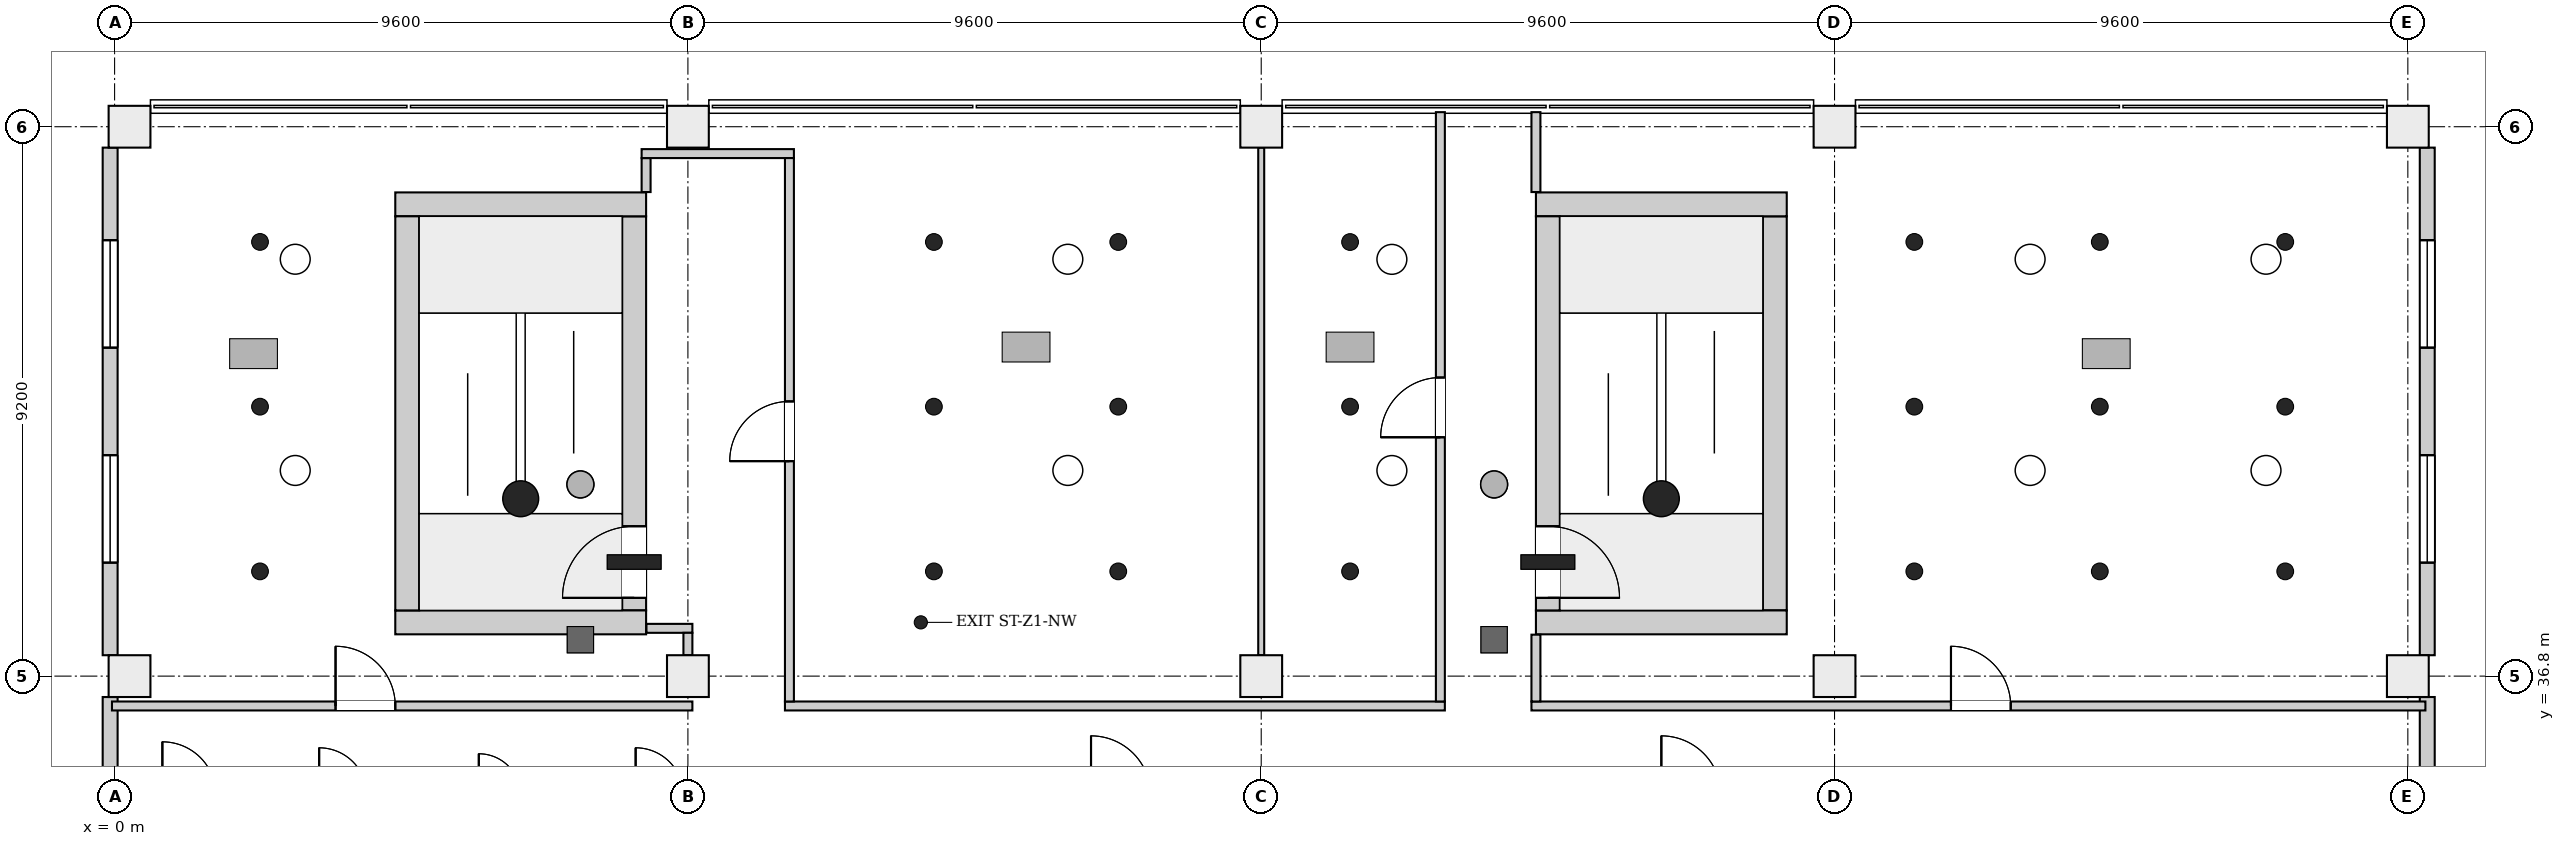
"""IFC4 building model, lengths in metres.
Left out: names, types, materials, properties, quantities, classifications, styles, units other than length and angle.
Written with IfcOpenShell. Run it as: python <this file> out.ifc"""

import sys

from ifc_helpers import new_model, si_unit, direction, frame, frame_2d, origin, origin_2d, place, context, subcontext, project, spatial, rectangle, extrude, element, fill, save


model = new_model("IFC4")
c1 = context("Model", 3, precision=1e-05, world=origin(), true_north=direction((0.0, 1.0)))
c2 = subcontext(c1, "Body", "Model", "MODEL_VIEW")
j1 = project(units=[si_unit("LENGTHUNIT", "METRE"), si_unit("PLANEANGLEUNIT", "RADIAN")], contexts=[c1])
p1 = place(None, origin())
s1 = spatial("IfcSite", under=j1, at=p1, CompositionType="ELEMENT")
p2 = place(p1, origin())
s2 = spatial("IfcBuilding", under=s1, at=p2, CompositionType="ELEMENT")
p3 = place(p2, frame((0.0, 0.0, 69.7)))
s3 = spatial("IfcBuildingStorey", under=s2, at=p3, CompositionType="ELEMENT", Elevation=69.7)
for number, where, z_axis, x_axis in (
    (1, (4.7, 37.7, 0.0), (0.0, 0.0, 1.0), (1.0, 0.0, 0.0)),
    (2, (4.7, 44.7, 0.0), (0.0, 0.0, 1.0), (1.0, 0.0, 0.0)),
):
    element("IfcWall", number, at=place(p3, frame(where, z_axis=z_axis, x_axis=x_axis)), inside=s3, PredefinedType="SHEAR", context=c2, shape_type="SweptSolid", body=[
        extrude(rectangle(XDim=4.2, YDim=0.4, at=frame_2d((2.1, 0.0))), origin(), (0.0, 0.0, 1.0), 4.2),
    ])
p4 = place(p3, frame((4.9, 37.9, 0.0), z_axis=(0.0, 0.0, 1.0), x_axis=(0.0, 1.0, 0.0)))
e3 = element("IfcWall", 3, at=p4, inside=s3, PredefinedType="SHEAR", context=c2, shape_type="SweptSolid", body=[
    extrude(rectangle(XDim=6.6, YDim=0.4, at=frame_2d((3.3, 0.0))), origin(), (0.0, 0.0, 1.0), 4.2),
])
p5 = place(p3, frame((8.7, 37.9, 0.0), z_axis=(0.0, 0.0, 1.0), x_axis=(0.0, 1.0, 0.0)))
e4 = element("IfcWall", 4, at=p5, inside=s3, PredefinedType="SHEAR", context=c2, shape_type="SweptSolid", body=[
    extrude(rectangle(XDim=6.6, YDim=0.4, at=frame_2d((3.3, 0.0))), origin(), (0.0, 0.0, 1.0), 4.2),
])
p6 = place(p5, frame((0.21, 0.0, 0.0)))
e5 = element("IfcOpeningElement", 5, at=p6, cuts=e4, PredefinedType="OPENING", context=c2, shape_type="SweptSolid", body=[
    extrude(rectangle(XDim=1.2, YDim=2.1, at=frame_2d((0.6, 1.05))), frame((0.0, 0.21, 0.0), z_axis=(0.0, -1.0, 0.0), x_axis=(1.0, 0.0, 0.0)), (0.0, 0.0, 1.0), 0.42),
])
for number, where, z_axis, x_axis in (
    (6, (23.8, 37.7, 0.0), (0.0, 0.0, 1.0), (1.0, 0.0, 0.0)),
    (7, (23.8, 44.7, 0.0), (0.0, 0.0, 1.0), (1.0, 0.0, 0.0)),
):
    element("IfcWall", number, at=place(p3, frame(where, z_axis=z_axis, x_axis=x_axis)), inside=s3, PredefinedType="SHEAR", context=c2, shape_type="SweptSolid", body=[
        extrude(rectangle(XDim=4.2, YDim=0.4, at=frame_2d((2.1, 0.0))), origin(), (0.0, 0.0, 1.0), 4.2),
    ])
p7 = place(p3, frame((24.0, 37.9, 0.0), z_axis=(0.0, 0.0, 1.0), x_axis=(0.0, 1.0, 0.0)))
e8 = element("IfcWall", 8, at=p7, inside=s3, PredefinedType="SHEAR", context=c2, shape_type="SweptSolid", body=[
    extrude(rectangle(XDim=6.6, YDim=0.4, at=frame_2d((3.3, 0.0))), origin(), (0.0, 0.0, 1.0), 4.2),
])
p8 = place(p7, frame((0.21, 0.0, 0.0)))
e9 = element("IfcOpeningElement", 9, at=p8, cuts=e8, PredefinedType="OPENING", context=c2, shape_type="SweptSolid", body=[
    extrude(rectangle(XDim=1.2, YDim=2.1, at=frame_2d((0.6, 1.05))), frame((0.0, 0.21, 0.0), z_axis=(0.0, -1.0, 0.0), x_axis=(1.0, 0.0, 0.0)), (0.0, 0.0, 1.0), 0.42),
])
p9 = place(p3, frame((27.8, 37.9, 0.0), z_axis=(0.0, 0.0, 1.0), x_axis=(0.0, 1.0, 0.0)))
e10 = element("IfcWall", 10, at=p9, inside=s3, PredefinedType="SHEAR", context=c2, shape_type="SweptSolid", body=[
    extrude(rectangle(XDim=6.6, YDim=0.4, at=frame_2d((3.3, 0.0))), origin(), (0.0, 0.0, 1.0), 4.2),
])
for number, where, z_axis, x_axis in (
    (11, (0.25, 36.8, 0.0), (0.0, 0.0, 1.0), (1.0, 0.0, 0.0)),
    (12, (9.6, 36.8, 0.0), (0.0, 0.0, 1.0), (1.0, 0.0, 0.0)),
    (13, (19.2, 36.8, 0.0), (0.0, 0.0, 1.0), (1.0, 0.0, 0.0)),
    (14, (28.8, 36.8, 0.0), (0.0, 0.0, 1.0), (1.0, 0.0, 0.0)),
    (15, (38.4, 36.8, 0.0), (0.0, 0.0, 1.0), (1.0, 0.0, 0.0)),
    (16, (0.25, 46.0, 0.0), (0.0, 0.0, 1.0), (1.0, 0.0, 0.0)),
    (17, (9.6, 46.0, 0.0), (0.0, 0.0, 1.0), (1.0, 0.0, 0.0)),
    (18, (19.2, 46.0, 0.0), (0.0, 0.0, 1.0), (1.0, 0.0, 0.0)),
    (19, (28.8, 46.0, 0.0), (0.0, 0.0, 1.0), (1.0, 0.0, 0.0)),
    (20, (38.4, 46.0, 0.0), (0.0, 0.0, 1.0), (1.0, 0.0, 0.0)),
):
    element("IfcColumn", number, at=place(p3, frame(where, z_axis=z_axis, x_axis=x_axis)), inside=s3, PredefinedType="COLUMN", context=c2, shape_type="SweptSolid", body=[
        extrude(rectangle(XDim=0.7, YDim=0.7, at=origin_2d()), origin(), (0.0, 0.0, 1.0), 4.2),
    ])
p10 = place(p3, frame((-0.074, 36.45, 0.0), z_axis=(0.0, 0.0, 1.0), x_axis=(0.0, -1.0, 0.0)))
e21 = element("IfcWall", 21, at=p10, inside=s3, PredefinedType="ELEMENTEDWALL", context=c2, shape_type="SweptSolid", body=[
    extrude(rectangle(XDim=8.5, YDim=0.25, at=frame_2d((4.25, 0.0))), origin(), (0.0, 0.0, 1.0), 3.9),
])
p11 = place(p10, frame((5.15, 0.0, 0.9)))
e22 = element("IfcOpeningElement", 22, at=p11, cuts=e21, PredefinedType="OPENING", context=c2, shape_type="SweptSolid", body=[
    extrude(rectangle(XDim=1.8, YDim=2.6, at=frame_2d((0.9, 1.3))), frame((0.0, 0.135, 0.0), z_axis=(0.0, -1.0, 0.0), x_axis=(1.0, 0.0, 0.0)), (0.0, 0.0, 1.0), 0.27),
])
p12 = place(p10, frame((1.8, 0.0, 0.9)))
e23 = element("IfcOpeningElement", 23, at=p12, cuts=e21, PredefinedType="OPENING", context=c2, shape_type="SweptSolid", body=[
    extrude(rectangle(XDim=1.8, YDim=2.6, at=frame_2d((0.9, 1.3))), frame((0.0, 0.135, 0.0), z_axis=(0.0, -1.0, 0.0), x_axis=(1.0, 0.0, 0.0)), (0.0, 0.0, 1.0), 0.27),
])
p13 = place(p3, frame((-0.074, 45.65, 0.0), z_axis=(0.0, 0.0, 1.0), x_axis=(0.0, -1.0, 0.0)))
e24 = element("IfcWall", 24, at=p13, inside=s3, PredefinedType="ELEMENTEDWALL", context=c2, shape_type="SweptSolid", body=[
    extrude(rectangle(XDim=8.5, YDim=0.25, at=frame_2d((4.25, 0.0))), origin(), (0.0, 0.0, 1.0), 3.9),
])
p14 = place(p13, frame((5.15, 0.0, 0.9)))
e25 = element("IfcOpeningElement", 25, at=p14, cuts=e24, PredefinedType="OPENING", context=c2, shape_type="SweptSolid", body=[
    extrude(rectangle(XDim=1.8, YDim=2.6, at=frame_2d((0.9, 1.3))), frame((0.0, 0.135, 0.0), z_axis=(0.0, -1.0, 0.0), x_axis=(1.0, 0.0, 0.0)), (0.0, 0.0, 1.0), 0.27),
])
p15 = place(p13, frame((1.55, 0.0, 0.9)))
e26 = element("IfcOpeningElement", 26, at=p15, cuts=e24, PredefinedType="OPENING", context=c2, shape_type="SweptSolid", body=[
    extrude(rectangle(XDim=1.8, YDim=2.6, at=frame_2d((0.9, 1.3))), frame((0.0, 0.135, 0.0), z_axis=(0.0, -1.0, 0.0), x_axis=(1.0, 0.0, 0.0)), (0.0, 0.0, 1.0), 0.27),
])
p16 = place(p3, frame((38.725, 27.95, 0.0), z_axis=(0.0, 0.0, 1.0), x_axis=(0.0, 1.0, 0.0)))
e27 = element("IfcWall", 27, at=p16, inside=s3, PredefinedType="ELEMENTEDWALL", context=c2, shape_type="SweptSolid", body=[
    extrude(rectangle(XDim=8.5, YDim=0.25, at=frame_2d((4.25, 0.0))), origin(), (0.0, 0.0, 1.0), 3.9),
])
p17 = place(p16, frame((4.35, 0.0, 0.0)))
e28 = element("IfcOpeningElement", 28, at=p17, cuts=e27, PredefinedType="OPENING", context=c2, shape_type="SweptSolid", body=[
    extrude(rectangle(XDim=1.8, YDim=2.4, at=frame_2d((0.9, 1.2))), frame((0.0, 0.135, 0.0), z_axis=(0.0, -1.0, 0.0), x_axis=(1.0, 0.0, 0.0)), (0.0, 0.0, 1.0), 0.27),
])
p18 = place(p16, frame((1.55, 0.0, 0.9)))
e29 = element("IfcOpeningElement", 29, at=p18, cuts=e27, PredefinedType="OPENING", context=c2, shape_type="SweptSolid", body=[
    extrude(rectangle(XDim=1.8, YDim=2.6, at=frame_2d((0.9, 1.3))), frame((0.0, 0.135, 0.0), z_axis=(0.0, -1.0, 0.0), x_axis=(1.0, 0.0, 0.0)), (0.0, 0.0, 1.0), 0.27),
])
p19 = place(p3, frame((38.725, 37.15, 0.0), z_axis=(0.0, 0.0, 1.0), x_axis=(0.0, 1.0, 0.0)))
e30 = element("IfcWall", 30, at=p19, inside=s3, PredefinedType="ELEMENTEDWALL", context=c2, shape_type="SweptSolid", body=[
    extrude(rectangle(XDim=8.5, YDim=0.25, at=frame_2d((4.25, 0.0))), origin(), (0.0, 0.0, 1.0), 3.9),
])
p20 = place(p19, frame((1.55, 0.0, 0.9)))
e31 = element("IfcOpeningElement", 31, at=p20, cuts=e30, PredefinedType="OPENING", context=c2, shape_type="SweptSolid", body=[
    extrude(rectangle(XDim=1.8, YDim=2.6, at=frame_2d((0.9, 1.3))), frame((0.0, 0.135, 0.0), z_axis=(0.0, -1.0, 0.0), x_axis=(1.0, 0.0, 0.0)), (0.0, 0.0, 1.0), 0.27),
])
p21 = place(p19, frame((5.15, 0.0, 0.9)))
e32 = element("IfcOpeningElement", 32, at=p21, cuts=e30, PredefinedType="OPENING", context=c2, shape_type="SweptSolid", body=[
    extrude(rectangle(XDim=1.8, YDim=2.6, at=frame_2d((0.9, 1.3))), frame((0.0, 0.135, 0.0), z_axis=(0.0, -1.0, 0.0), x_axis=(1.0, 0.0, 0.0)), (0.0, 0.0, 1.0), 0.27),
])
p22 = place(p3, frame((-0.044, 36.3, 0.0), z_axis=(0.0, 0.0, 1.0), x_axis=(1.0, 0.0, 0.0)))
e33 = element("IfcWall", 33, at=p22, inside=s3, PredefinedType="PARTITIONING", context=c2, shape_type="SweptSolid", body=[
    extrude(rectangle(XDim=9.719, YDim=0.15, at=frame_2d((4.859, 0.0))), origin(), (0.0, 0.0, 1.0), 3.9),
])
p23 = place(p22, frame((3.744, 0.0, 0.0)))
e34 = element("IfcOpeningElement", 34, at=p23, cuts=e33, PredefinedType="OPENING", context=c2, shape_type="SweptSolid", body=[
    extrude(rectangle(XDim=1.0, YDim=2.1, at=frame_2d((0.5, 1.05))), frame((0.0, 0.085, 0.0), z_axis=(0.0, -1.0, 0.0), x_axis=(1.0, 0.0, 0.0)), (0.0, 0.0, 1.0), 0.17),
])
p24 = place(p3, frame((8.9, 44.906, 0.0), z_axis=(0.0, 0.0, 1.0), x_axis=(0.0, 1.0, 0.0)))
e35 = element("IfcWall", 35, at=p24, inside=s3, PredefinedType="PARTITIONING", context=c2, shape_type="SweptSolid", body=[
    extrude(rectangle(XDim=0.569, YDim=0.15, at=frame_2d((0.285, 0.0))), origin(), (0.0, 0.0, 1.0), 3.9),
])
p25 = place(p3, frame((8.825, 45.55, 0.0), z_axis=(0.0, 0.0, 1.0), x_axis=(1.0, 0.0, 0.0)))
e36 = element("IfcWall", 36, at=p25, inside=s3, PredefinedType="PARTITIONING", context=c2, shape_type="SweptSolid", body=[
    extrude(rectangle(XDim=2.55, YDim=0.15, at=frame_2d((1.275, 0.0))), origin(), (0.0, 0.0, 1.0), 3.9),
])
p26 = place(p3, frame((8.906, 37.6, 0.0), z_axis=(0.0, 0.0, 1.0), x_axis=(1.0, 0.0, 0.0)))
e37 = element("IfcWall", 37, at=p26, inside=s3, PredefinedType="PARTITIONING", context=c2, shape_type="SweptSolid", body=[
    extrude(rectangle(XDim=0.769, YDim=0.15, at=frame_2d((0.385, 0.0))), origin(), (0.0, 0.0, 1.0), 3.9),
])
p27 = place(p3, frame((9.6, 37.15, 0.0), z_axis=(0.0, 0.0, 1.0), x_axis=(0.0, 1.0, 0.0)))
e38 = element("IfcWall", 38, at=p27, inside=s3, PredefinedType="PARTITIONING", context=c2, shape_type="SweptSolid", body=[
    extrude(rectangle(XDim=0.375, YDim=0.15, at=frame_2d((0.188, 0.0))), origin(), (0.0, 0.0, 1.0), 3.9),
])
p28 = place(p3, frame((11.225, 36.3, 0.0), z_axis=(0.0, 0.0, 1.0), x_axis=(1.0, 0.0, 0.0)))
e39 = element("IfcWall", 39, at=p28, inside=s3, PredefinedType="PARTITIONING", context=c2, shape_type="SweptSolid", body=[
    extrude(rectangle(XDim=11.05, YDim=0.15, at=frame_2d((5.525, 0.0))), origin(), (0.0, 0.0, 1.0), 3.9),
])
p29 = place(p3, frame((11.3, 36.375, 0.0), z_axis=(0.0, 0.0, 1.0), x_axis=(0.0, 1.0, 0.0)))
e40 = element("IfcWall", 40, at=p29, inside=s3, PredefinedType="PARTITIONING", context=c2, shape_type="SweptSolid", body=[
    extrude(rectangle(XDim=9.1, YDim=0.15, at=frame_2d((4.55, 0.0))), origin(), (0.0, 0.0, 1.0), 3.9),
])
p30 = place(p29, frame((4.025, 0.0, 0.0)))
e41 = element("IfcOpeningElement", 41, at=p30, cuts=e40, PredefinedType="OPENING", context=c2, shape_type="SweptSolid", body=[
    extrude(rectangle(XDim=1.0, YDim=2.1, at=frame_2d((0.5, 1.05))), frame((0.0, 0.085, 0.0), z_axis=(0.0, -1.0, 0.0), x_axis=(1.0, 0.0, 0.0)), (0.0, 0.0, 1.0), 0.17),
])
p31 = place(p3, frame((19.2, 37.15, 0.0), z_axis=(0.0, 0.0, 1.0), x_axis=(0.0, 1.0, 0.0)))
e42 = element("IfcWall", 42, at=p31, inside=s3, PredefinedType="PARTITIONING", context=c2, shape_type="SweptSolid", body=[
    extrude(rectangle(XDim=8.5, YDim=0.1, at=frame_2d((4.25, 0.0))), origin(), (0.0, 0.0, 1.0), 3.9),
])
p32 = place(p3, frame((22.2, 36.375, 0.0), z_axis=(0.0, 0.0, 1.0), x_axis=(0.0, 1.0, 0.0)))
e43 = element("IfcWall", 43, at=p32, inside=s3, PredefinedType="PARTITIONING", context=c2, shape_type="SweptSolid", body=[
    extrude(rectangle(XDim=9.869, YDim=0.15, at=frame_2d((4.935, 0.0))), origin(), (0.0, 0.0, 1.0), 3.9),
])
p33 = place(p32, frame((4.425, 0.0, 0.0)))
e44 = element("IfcOpeningElement", 44, at=p33, cuts=e43, PredefinedType="OPENING", context=c2, shape_type="SweptSolid", body=[
    extrude(rectangle(XDim=1.0, YDim=2.1, at=frame_2d((0.5, 1.05))), frame((0.0, 0.085, 0.0), z_axis=(0.0, -1.0, 0.0), x_axis=(1.0, 0.0, 0.0)), (0.0, 0.0, 1.0), 0.17),
])
p34 = place(p3, frame((23.725, 36.3, 0.0), z_axis=(0.0, 0.0, 1.0), x_axis=(1.0, 0.0, 0.0)))
e45 = element("IfcWall", 45, at=p34, inside=s3, PredefinedType="PARTITIONING", context=c2, shape_type="SweptSolid", body=[
    extrude(rectangle(XDim=14.969, YDim=0.15, at=frame_2d((7.484, 0.0))), origin(), (0.0, 0.0, 1.0), 3.9),
])
p35 = place(p34, frame((7.025, 0.0, 0.0)))
e46 = element("IfcOpeningElement", 46, at=p35, cuts=e45, PredefinedType="OPENING", context=c2, shape_type="SweptSolid", body=[
    extrude(rectangle(XDim=1.0, YDim=2.1, at=frame_2d((0.5, 1.05))), frame((0.0, 0.085, 0.0), z_axis=(0.0, -1.0, 0.0), x_axis=(1.0, 0.0, 0.0)), (0.0, 0.0, 1.0), 0.17),
])
p36 = place(p3, frame((23.8, 36.375, 0.0), z_axis=(0.0, 0.0, 1.0), x_axis=(0.0, 1.0, 0.0)))
e47 = element("IfcWall", 47, at=p36, inside=s3, PredefinedType="PARTITIONING", context=c2, shape_type="SweptSolid", body=[
    extrude(rectangle(XDim=1.119, YDim=0.15, at=frame_2d((0.56, 0.0))), origin(), (0.0, 0.0, 1.0), 3.9),
])
p37 = place(p3, frame((23.8, 44.906, 0.0), z_axis=(0.0, 0.0, 1.0), x_axis=(0.0, 1.0, 0.0)))
e48 = element("IfcWall", 48, at=p37, inside=s3, PredefinedType="PARTITIONING", context=c2, shape_type="SweptSolid", body=[
    extrude(rectangle(XDim=1.338, YDim=0.15, at=frame_2d((0.669, 0.0))), origin(), (0.0, 0.0, 1.0), 3.9),
])
p38 = place(p14, origin())
e49 = element("IfcWindow", 49, at=p38, inside=s3, PartitioningType="SINGLE_PANEL", PredefinedType="WINDOW", context=c2, shape_type="SweptSolid", body=[
    extrude(rectangle(XDim=1.8, YDim=2.6, at=frame_2d((0.9, 1.3))), frame((0.0, 0.03, 0.0), z_axis=(0.0, -1.0, 0.0), x_axis=(1.0, 0.0, 0.0)), (0.0, 0.0, 1.0), 0.06),
])
fill(e25, e49)
p39 = place(p15, origin())
e50 = element("IfcWindow", 50, at=p39, inside=s3, PartitioningType="SINGLE_PANEL", PredefinedType="WINDOW", context=c2, shape_type="SweptSolid", body=[
    extrude(rectangle(XDim=1.8, YDim=2.6, at=frame_2d((0.9, 1.3))), frame((0.0, 0.03, 0.0), z_axis=(0.0, -1.0, 0.0), x_axis=(1.0, 0.0, 0.0)), (0.0, 0.0, 1.0), 0.06),
])
fill(e26, e50)
p40 = place(p20, origin())
e51 = element("IfcWindow", 51, at=p40, inside=s3, PartitioningType="SINGLE_PANEL", PredefinedType="WINDOW", context=c2, shape_type="SweptSolid", body=[
    extrude(rectangle(XDim=1.8, YDim=2.6, at=frame_2d((0.9, 1.3))), frame((0.0, 0.03, 0.0), z_axis=(0.0, -1.0, 0.0), x_axis=(1.0, 0.0, 0.0)), (0.0, 0.0, 1.0), 0.06),
])
fill(e31, e51)
p41 = place(p21, origin())
e52 = element("IfcWindow", 52, at=p41, inside=s3, PartitioningType="SINGLE_PANEL", PredefinedType="WINDOW", context=c2, shape_type="SweptSolid", body=[
    extrude(rectangle(XDim=1.8, YDim=2.6, at=frame_2d((0.9, 1.3))), frame((0.0, 0.03, 0.0), z_axis=(0.0, -1.0, 0.0), x_axis=(1.0, 0.0, 0.0)), (0.0, 0.0, 1.0), 0.06),
])
fill(e32, e52)
p42 = place(p6, origin())
e53 = element("IfcDoor", 53, at=p42, inside=s3, OperationType="SINGLE_SWING_RIGHT", PredefinedType="DOOR", context=c2, shape_type="SweptSolid", body=[
    extrude(rectangle(XDim=1.2, YDim=2.1, at=frame_2d((0.6, 1.05))), frame((0.0, 0.025, 0.0), z_axis=(0.0, -1.0, 0.0), x_axis=(1.0, 0.0, 0.0)), (0.0, 0.0, 1.0), 0.05),
])
fill(e5, e53)
p43 = place(p8, origin())
e54 = element("IfcDoor", 54, at=p43, inside=s3, OperationType="SINGLE_SWING_LEFT", PredefinedType="DOOR", context=c2, shape_type="SweptSolid", body=[
    extrude(rectangle(XDim=1.2, YDim=2.1, at=frame_2d((0.6, 1.05))), frame((0.0, 0.025, 0.0), z_axis=(0.0, -1.0, 0.0), x_axis=(1.0, 0.0, 0.0)), (0.0, 0.0, 1.0), 0.05),
])
fill(e9, e54)
p44 = place(p23, origin())
e55 = element("IfcDoor", 55, at=p44, inside=s3, OperationType="SINGLE_SWING_RIGHT", PredefinedType="DOOR", context=c2, shape_type="SweptSolid", body=[
    extrude(rectangle(XDim=1.0, YDim=2.1, at=frame_2d((0.5, 1.05))), frame((0.0, 0.025, 0.0), z_axis=(0.0, -1.0, 0.0), x_axis=(1.0, 0.0, 0.0)), (0.0, 0.0, 1.0), 0.05),
])
fill(e34, e55)
p45 = place(p30, origin())
e56 = element("IfcDoor", 56, at=p45, inside=s3, OperationType="SINGLE_SWING_LEFT", PredefinedType="DOOR", context=c2, shape_type="SweptSolid", body=[
    extrude(rectangle(XDim=1.0, YDim=2.1, at=frame_2d((0.5, 1.05))), frame((0.0, 0.025, 0.0), z_axis=(0.0, -1.0, 0.0), x_axis=(1.0, 0.0, 0.0)), (0.0, 0.0, 1.0), 0.05),
])
fill(e41, e56)
p46 = place(p33, origin())
e57 = element("IfcDoor", 57, at=p46, inside=s3, OperationType="SINGLE_SWING_RIGHT", PredefinedType="DOOR", context=c2, shape_type="SweptSolid", body=[
    extrude(rectangle(XDim=1.0, YDim=2.1, at=frame_2d((0.5, 1.05))), frame((0.0, 0.025, 0.0), z_axis=(0.0, -1.0, 0.0), x_axis=(1.0, 0.0, 0.0)), (0.0, 0.0, 1.0), 0.05),
])
fill(e44, e57)
p47 = place(p35, origin())
e58 = element("IfcDoor", 58, at=p47, inside=s3, OperationType="SINGLE_SWING_RIGHT", PredefinedType="DOOR", context=c2, shape_type="SweptSolid", body=[
    extrude(rectangle(XDim=1.0, YDim=2.1, at=frame_2d((0.5, 1.05))), frame((0.0, 0.025, 0.0), z_axis=(0.0, -1.0, 0.0), x_axis=(1.0, 0.0, 0.0)), (0.0, 0.0, 1.0), 0.05),
])
fill(e46, e58)
save(model, sys.argv[1])
